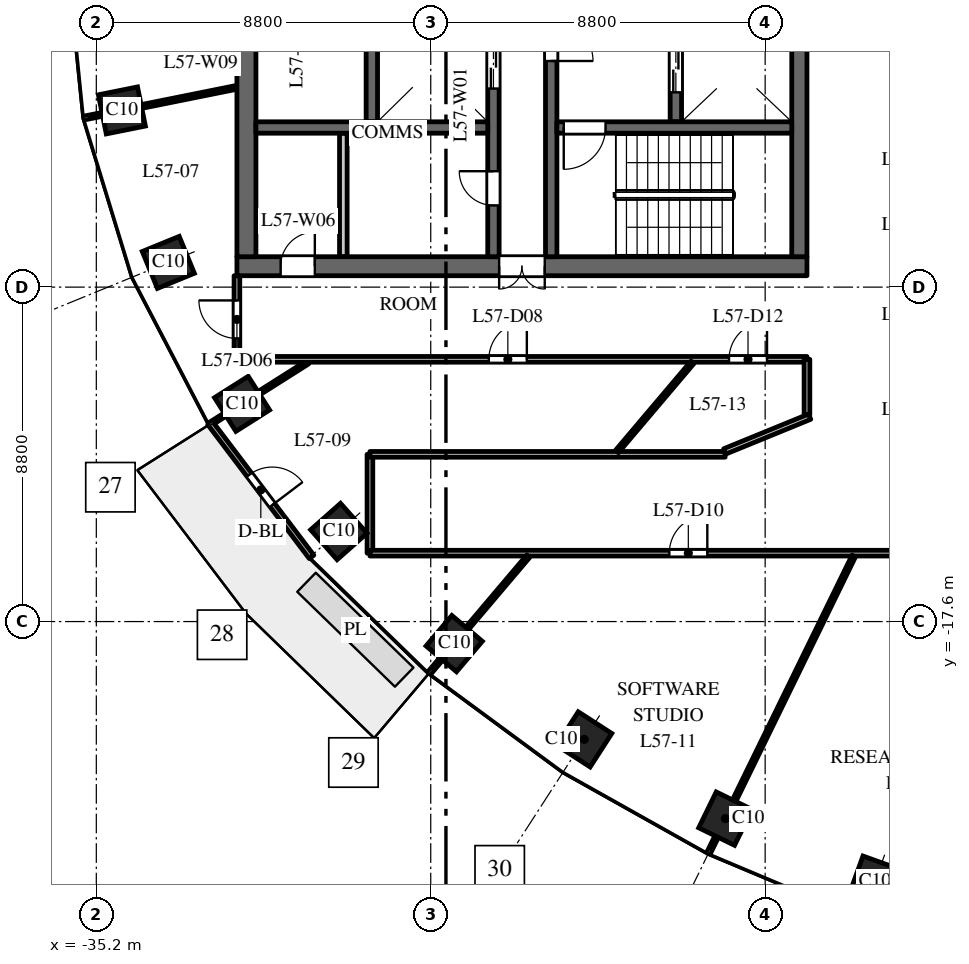
"""IFC4 building model, lengths in metres.
Left out: names, types, materials, properties, quantities, classifications, styles, units other than length and angle.
Written with IfcOpenShell. Run it as: python <this file> out.ifc"""

import sys

from ifc_helpers import new_model, si_unit, direction, frame, frame_2d, origin, origin_2d, place, context, subcontext, project, spatial, rectangle, extrude, element, fill, save


model = new_model("IFC4")
c1 = context("Model", 3, precision=1e-05, world=origin(), true_north=direction((0.0, 1.0)))
c2 = subcontext(c1, "Body", "Model", "MODEL_VIEW")
j1 = project(units=[si_unit("LENGTHUNIT", "METRE"), si_unit("PLANEANGLEUNIT", "RADIAN")], contexts=[c1])
p1 = place(None, origin())
s1 = spatial("IfcSite", under=j1, at=p1, CompositionType="ELEMENT")
p2 = place(p1, origin())
s2 = spatial("IfcBuilding", under=s1, at=p2, CompositionType="ELEMENT")
p3 = place(p2, frame((0.0, 0.0, 269.5)))
s3 = spatial("IfcBuildingStorey", under=s2, at=p3, CompositionType="ELEMENT", Elevation=269.5)
for number, where, z_axis, x_axis in (
    (1, (-34.527, -4.151, 0.0), (0.0, 0.0, 1.0), (0.197, -0.98, 0.0)),
    (2, (-33.305, -8.149, 0.0), (0.0, 0.0, 1.0), (0.379, -0.925, 0.0)),
    (3, (-31.365, -11.871, 0.0), (0.0, 0.0, 1.0), (0.535, -0.845, 0.0)),
    (4, (-28.819, -15.23, 0.0), (0.0, 0.0, 1.0), (0.663, -0.749, 0.0)),
    (5, (-25.783, -18.18, 0.0), (0.0, 0.0, 1.0), (0.763, -0.646, 0.0)),
    (6, (-22.362, -20.7, 0.0), (0.0, 0.0, 1.0), (0.84, -0.542, 0.0)),
    (7, (-18.646, -22.785, 0.0), (0.0, 0.0, 1.0), (0.898, -0.439, 0.0)),
    (8, (-14.709, -24.441, 0.0), (0.0, 0.0, 1.0), (0.941, -0.338, 0.0)),
):
    element("IfcColumn", number, at=place(p3, frame(where, z_axis=z_axis, x_axis=x_axis)), inside=s3, PredefinedType="COLUMN", context=c2, shape_type="SweptSolid", body=[
        extrude(rectangle(XDim=1.05, YDim=1.05, at=origin_2d()), origin(), (0.0, 0.0, 1.0), 4.0),
    ])
p4 = place(p3, frame((-16.5, -8.25, 0.0), z_axis=(0.0, 0.0, 1.0), x_axis=(-1.0, 0.0, 0.0)))
e9 = element("IfcWall", 9, at=p4, inside=s3, PredefinedType="SHEAR", context=c2, shape_type="SweptSolid", body=[
    extrude(rectangle(XDim=15.0, YDim=0.5, at=frame_2d((7.5, 0.0))), origin(), (0.0, 0.0, 1.0), 3.7),
])
p5 = place(p4, frame((6.9, 0.0, 0.0)))
e10 = element("IfcOpeningElement", 10, at=p5, cuts=e9, PredefinedType="OPENING", context=c2, shape_type="SweptSolid", body=[
    extrude(rectangle(XDim=1.2, YDim=2.1, at=frame_2d((0.6, 1.05))), frame((0.0, 0.26, 0.0), z_axis=(0.0, -1.0, 0.0), x_axis=(1.0, 0.0, 0.0)), (0.0, 0.0, 1.0), 0.52),
])
p6 = place(p4, frame((12.95, 0.0, 0.0)))
e11 = element("IfcOpeningElement", 11, at=p6, cuts=e9, PredefinedType="OPENING", context=c2, shape_type="SweptSolid", body=[
    extrude(rectangle(XDim=0.9, YDim=2.1, at=frame_2d((0.45, 1.05))), frame((0.0, 0.26, 0.0), z_axis=(0.0, -1.0, 0.0), x_axis=(1.0, 0.0, 0.0)), (0.0, 0.0, 1.0), 0.52),
])
p7 = place(p3, frame((-27.95, -4.45, 0.0), z_axis=(0.0, 0.0, 1.0), x_axis=(0.0, 1.0, 0.0)))
e12 = element("IfcWall", 12, at=p7, inside=s3, PredefinedType="SHEAR", context=c2, shape_type="SweptSolid", body=[
    extrude(rectangle(XDim=8.9, YDim=0.3, at=frame_2d((4.45, 0.0))), origin(), (0.0, 0.0, 1.0), 3.7),
])
p8 = place(p3, frame((-19.95, -4.45, 0.0), z_axis=(0.0, 0.0, 1.0), x_axis=(0.0, 1.0, 0.0)))
e13 = element("IfcWall", 13, at=p8, inside=s3, PredefinedType="SHEAR", context=c2, shape_type="SweptSolid", body=[
    extrude(rectangle(XDim=8.9, YDim=0.3, at=frame_2d((4.45, 0.0))), origin(), (0.0, 0.0, 1.0), 3.7),
])
p9 = place(p8, frame((0.775, 0.0, 0.0)))
e14 = element("IfcOpeningElement", 14, at=p9, cuts=e13, PredefinedType="OPENING", context=c2, shape_type="SweptSolid", body=[
    extrude(rectangle(XDim=1.2, YDim=2.1, at=frame_2d((0.6, 1.05))), frame((0.0, 0.16, 0.0), z_axis=(0.0, -1.0, 0.0), x_axis=(1.0, 0.0, 0.0)), (0.0, 0.0, 1.0), 0.32),
])
p10 = place(p8, frame((7.25, 0.0, 0.0)))
e15 = element("IfcOpeningElement", 15, at=p10, cuts=e13, PredefinedType="OPENING", context=c2, shape_type="SweptSolid", body=[
    extrude(rectangle(XDim=1.1, YDim=2.1, at=frame_2d((0.55, 1.05))), frame((0.0, 0.16, 0.0), z_axis=(0.0, -1.0, 0.0), x_axis=(1.0, 0.0, 0.0)), (0.0, 0.0, 1.0), 0.32),
])
p11 = place(p3, frame((-24.75, -8.0, 0.0), z_axis=(0.0, 0.0, 1.0), x_axis=(0.0, 1.0, 0.0)))
e16 = element("IfcWall", 16, at=p11, inside=s3, PredefinedType="SHEAR", context=c2, shape_type="SweptSolid", body=[
    extrude(rectangle(XDim=16.0, YDim=0.3, at=frame_2d((8.0, 0.0))), origin(), (0.0, 0.0, 1.0), 3.7),
])
p12 = place(p11, frame((4.425, 0.0, 0.0)))
e17 = element("IfcOpeningElement", 17, at=p12, cuts=e16, PredefinedType="OPENING", context=c2, shape_type="SweptSolid", body=[
    extrude(rectangle(XDim=1.1, YDim=2.1, at=frame_2d((0.55, 1.05))), frame((0.0, 0.16, 0.0), z_axis=(0.0, -1.0, 0.0), x_axis=(1.0, 0.0, 0.0)), (0.0, 0.0, 1.0), 0.32),
])
p13 = place(p11, frame((7.45, 0.0, 0.0)))
e18 = element("IfcOpeningElement", 18, at=p13, cuts=e16, PredefinedType="OPENING", context=c2, shape_type="SweptSolid", body=[
    extrude(rectangle(XDim=1.1, YDim=2.1, at=frame_2d((0.55, 1.05))), frame((0.0, 0.16, 0.0), z_axis=(0.0, -1.0, 0.0), x_axis=(1.0, 0.0, 0.0)), (0.0, 0.0, 1.0), 0.32),
])
p14 = place(p11, frame((10.475, 0.0, 0.0)))
e19 = element("IfcOpeningElement", 19, at=p14, cuts=e16, PredefinedType="OPENING", context=c2, shape_type="SweptSolid", body=[
    extrude(rectangle(XDim=1.1, YDim=2.1, at=frame_2d((0.55, 1.05))), frame((0.0, 0.16, 0.0), z_axis=(0.0, -1.0, 0.0), x_axis=(1.0, 0.0, 0.0)), (0.0, 0.0, 1.0), 0.32),
])
p15 = place(p11, frame((13.75, 0.0, 0.0)))
e20 = element("IfcOpeningElement", 20, at=p15, cuts=e16, PredefinedType="OPENING", context=c2, shape_type="SweptSolid", body=[
    extrude(rectangle(XDim=0.9, YDim=2.1, at=frame_2d((0.45, 1.05))), frame((0.0, 0.16, 0.0), z_axis=(0.0, -1.0, 0.0), x_axis=(1.0, 0.0, 0.0)), (0.0, 0.0, 1.0), 0.32),
])
p16 = place(p11, frame((1.35, 0.0, 0.0)))
e21 = element("IfcOpeningElement", 21, at=p16, cuts=e16, PredefinedType="OPENING", context=c2, shape_type="SweptSolid", body=[
    extrude(rectangle(XDim=0.9, YDim=2.1, at=frame_2d((0.45, 1.05))), frame((0.0, 0.16, 0.0), z_axis=(0.0, -1.0, 0.0), x_axis=(1.0, 0.0, 0.0)), (0.0, 0.0, 1.0), 0.32),
])
p17 = place(p3, frame((-16.7, -8.0, 0.0), z_axis=(0.0, 0.0, 1.0), x_axis=(0.0, 1.0, 0.0)))
e22 = element("IfcWall", 22, at=p17, inside=s3, PredefinedType="SHEAR", context=c2, shape_type="SweptSolid", body=[
    extrude(rectangle(XDim=16.0, YDim=0.4, at=frame_2d((8.0, 0.0))), origin(), (0.0, 0.0, 1.0), 3.7),
])
p18 = place(p3, frame((-31.25, -8.0, 0.0), z_axis=(0.0, 0.0, 1.0), x_axis=(0.0, 1.0, 0.0)))
e23 = element("IfcWall", 23, at=p18, inside=s3, PredefinedType="SHEAR", context=c2, shape_type="SweptSolid", body=[
    extrude(rectangle(XDim=16.0, YDim=0.5, at=frame_2d((8.0, 0.0))), origin(), (0.0, 0.0, 1.0), 3.7),
])
p19 = place(p3, frame((-28.7, -8.0, 0.0), z_axis=(0.0, 0.0, 1.0), x_axis=(0.0, 1.0, 0.0)))
e24 = element("IfcWall", 24, at=p19, inside=s3, PredefinedType="PARTITIONING", context=c2, shape_type="SweptSolid", body=[
    extrude(rectangle(XDim=3.25, YDim=0.2, at=frame_2d((1.625, 0.0))), origin(), (0.0, 0.0, 1.0), 3.7),
])
p20 = place(p3, frame((-24.9, -4.6, 0.0), z_axis=(0.0, 0.0, 1.0), x_axis=(-1.0, 0.0, 0.0)))
e25 = element("IfcWall", 25, at=p20, inside=s3, PredefinedType="SHEAR", context=c2, shape_type="SweptSolid", body=[
    extrude(rectangle(XDim=6.1, YDim=0.3, at=frame_2d((3.05, 0.0))), origin(), (0.0, 0.0, 1.0), 3.7),
])
p21 = place(p3, frame((-23.23, -8.0, 0.0), z_axis=(0.0, 0.0, 1.0), x_axis=(0.0, 1.0, 0.0)))
e26 = element("IfcWall", 26, at=p21, inside=s3, PredefinedType="SHEAR", context=c2, shape_type="SweptSolid", body=[
    extrude(rectangle(XDim=7.875, YDim=0.3, at=frame_2d((3.938, 0.0))), origin(), (0.0, 0.0, 1.0), 3.7),
])
p22 = place(p21, frame((5.15, 0.0, 0.0)))
e27 = element("IfcOpeningElement", 27, at=p22, cuts=e26, PredefinedType="OPENING", context=c2, shape_type="SweptSolid", body=[
    extrude(rectangle(XDim=1.1, YDim=2.1, at=frame_2d((0.55, 1.05))), frame((0.0, 0.16, 0.0), z_axis=(0.0, -1.0, 0.0), x_axis=(1.0, 0.0, 0.0)), (0.0, 0.0, 1.0), 0.32),
])
p23 = place(p3, frame((-16.9, -4.6, 0.0), z_axis=(0.0, 0.0, 1.0), x_axis=(-1.0, 0.0, 0.0)))
e28 = element("IfcWall", 28, at=p23, inside=s3, PredefinedType="SHEAR", context=c2, shape_type="SweptSolid", body=[
    extrude(rectangle(XDim=6.18, YDim=0.3, at=frame_2d((3.09, 0.0))), origin(), (0.0, 0.0, 1.0), 3.7),
])
p24 = place(p23, frame((4.9, 0.0, 0.0)))
e29 = element("IfcOpeningElement", 29, at=p24, cuts=e28, PredefinedType="OPENING", context=c2, shape_type="SweptSolid", body=[
    extrude(rectangle(XDim=1.1, YDim=2.1, at=frame_2d((0.55, 1.05))), frame((0.0, 0.16, 0.0), z_axis=(0.0, -1.0, 0.0), x_axis=(1.0, 0.0, 0.0)), (0.0, 0.0, 1.0), 0.32),
])
p25 = place(p3, frame((-32.208, -12.374, 0.0), z_axis=(0.0, 0.0, 1.0), x_axis=(0.604045763106, -0.796949632081, 0.0)))
e30 = element("IfcWall", 30, at=p25, inside=s3, PredefinedType="STANDARD", context=c2, shape_type="SweptSolid", body=[
    extrude(rectangle(XDim=4.423, YDim=0.15, at=frame_2d((2.212, 0.0))), origin(), (0.0, 0.0, 1.0), 3.7),
])
p26 = place(p25, frame((1.712, 0.0, 0.0)))
e31 = element("IfcOpeningElement", 31, at=p26, cuts=e30, PredefinedType="OPENING", context=c2, shape_type="SweptSolid", body=[
    extrude(rectangle(XDim=1.0, YDim=2.4, at=frame_2d((0.5, 1.2))), frame((0.0, 0.085, 0.0), z_axis=(0.0, -1.0, 0.0), x_axis=(1.0, 0.0, 0.0)), (0.0, 0.0, 1.0), 0.17),
])
p27 = place(p3, frame((-35.512, -4.349, 0.0), z_axis=(0.0, 0.0, 1.0), x_axis=(0.980357474535, 0.197228857227, 0.0)))
e32 = element("IfcWall", 32, at=p27, inside=s3, PredefinedType="PARTITIONING", context=c2, shape_type="SweptSolid", body=[
    extrude(rectangle(XDim=4.092, YDim=0.1, at=frame_2d((2.046, 0.0))), origin(), (0.0, 0.0, 1.0), 3.2),
])
p28 = place(p3, frame((-32.212, -12.408, 0.0), z_axis=(0.0, 0.0, 1.0), x_axis=(0.844810627195, 0.535065420467, 0.0)))
e33 = element("IfcWall", 33, at=p28, inside=s3, PredefinedType="PARTITIONING", context=c2, shape_type="SweptSolid", body=[
    extrude(rectangle(XDim=3.048, YDim=0.1, at=frame_2d((1.524, 0.0))), origin(), (0.0, 0.0, 1.0), 3.7),
])
p29 = place(p3, frame((-31.5, -10.7, 0.0), z_axis=(0.0, 0.0, 1.0), x_axis=(0.0, 1.0, 0.0)))
e34 = element("IfcWall", 34, at=p29, inside=s3, PredefinedType="PARTITIONING", context=c2, shape_type="SweptSolid", body=[
    extrude(rectangle(XDim=2.2, YDim=0.15, at=frame_2d((1.1, 0.0))), origin(), (0.0, 0.0, 1.0), 3.7),
])
p30 = place(p29, frame((0.55, 0.0, 0.0)))
e35 = element("IfcOpeningElement", 35, at=p30, cuts=e34, PredefinedType="OPENING", context=c2, shape_type="SweptSolid", body=[
    extrude(rectangle(XDim=1.0, YDim=2.1, at=frame_2d((0.5, 1.05))), frame((0.0, 0.085, 0.0), z_axis=(0.0, -1.0, 0.0), x_axis=(1.0, 0.0, 0.0)), (0.0, 0.0, 1.0), 0.17),
])
p31 = place(p3, frame((-31.5, -10.7, 0.0), z_axis=(0.0, 0.0, 1.0), x_axis=(1.0, 0.0, 0.0)))
e36 = element("IfcWall", 36, at=p31, inside=s3, PredefinedType="PARTITIONING", context=c2, shape_type="SweptSolid", body=[
    extrude(rectangle(XDim=15.0, YDim=0.15, at=frame_2d((7.5, 0.0))), origin(), (0.0, 0.0, 1.0), 3.1),
])
p32 = place(p31, frame((6.629, 0.0, 0.0)))
e37 = element("IfcOpeningElement", 37, at=p32, cuts=e36, PredefinedType="OPENING", context=c2, shape_type="SweptSolid", body=[
    extrude(rectangle(XDim=1.0, YDim=2.1, at=frame_2d((0.5, 1.05))), frame((0.0, 0.085, 0.0), z_axis=(0.0, -1.0, 0.0), x_axis=(1.0, 0.0, 0.0)), (0.0, 0.0, 1.0), 0.17),
])
p33 = place(p31, frame((12.949, 0.0, 0.0)))
e38 = element("IfcOpeningElement", 38, at=p33, cuts=e36, PredefinedType="OPENING", context=c2, shape_type="SweptSolid", body=[
    extrude(rectangle(XDim=1.0, YDim=2.1, at=frame_2d((0.5, 1.05))), frame((0.0, 0.085, 0.0), z_axis=(0.0, -1.0, 0.0), x_axis=(1.0, 0.0, 0.0)), (0.0, 0.0, 1.0), 0.17),
])
p34 = place(p3, frame((-28.0, -15.8, 0.0), z_axis=(0.0, 0.0, 1.0), x_axis=(0.0, 1.0, 0.0)))
e39 = element("IfcWall", 39, at=p34, inside=s3, PredefinedType="PARTITIONING", context=c2, shape_type="SweptSolid", body=[
    extrude(rectangle(XDim=2.6, YDim=0.15, at=frame_2d((1.3, 0.0))), origin(), (0.0, 0.0, 1.0), 3.0),
])
p35 = place(p3, frame((-28.0, -15.8, 0.0), z_axis=(0.0, 0.0, 1.0), x_axis=(1.0, 0.0, 0.0)))
e40 = element("IfcWall", 40, at=p35, inside=s3, PredefinedType="PARTITIONING", context=c2, shape_type="SweptSolid", body=[
    extrude(rectangle(XDim=19.809, YDim=0.15, at=frame_2d((9.905, 0.0))), origin(), (0.0, 0.0, 1.0), 2.75),
])
p36 = place(p35, frame((7.878, 0.0, 0.0)))
e41 = element("IfcOpeningElement", 41, at=p36, cuts=e40, PredefinedType="OPENING", context=c2, shape_type="SweptSolid", body=[
    extrude(rectangle(XDim=1.0, YDim=2.1, at=frame_2d((0.5, 1.05))), frame((0.0, 0.085, 0.0), z_axis=(0.0, -1.0, 0.0), x_axis=(1.0, 0.0, 0.0)), (0.0, 0.0, 1.0), 0.17),
])
p37 = place(p35, frame((15.91, 0.0, 0.0)))
e42 = element("IfcOpeningElement", 42, at=p37, cuts=e40, PredefinedType="OPENING", context=c2, shape_type="SweptSolid", body=[
    extrude(rectangle(XDim=1.0, YDim=2.1, at=frame_2d((0.5, 1.05))), frame((0.0, 0.085, 0.0), z_axis=(0.0, -1.0, 0.0), x_axis=(1.0, 0.0, 0.0)), (0.0, 0.0, 1.0), 0.17),
])
p38 = place(p3, frame((-28.0, -13.2, 0.0), z_axis=(0.0, 0.0, 1.0), x_axis=(1.0, 0.0, 0.0)))
e43 = element("IfcWall", 43, at=p38, inside=s3, PredefinedType="PARTITIONING", context=c2, shape_type="SweptSolid", body=[
    extrude(rectangle(XDim=9.347, YDim=0.15, at=frame_2d((4.673, 0.0))), origin(), (0.0, 0.0, 1.0), 2.75),
])
p39 = place(p3, frame((-26.43, -18.945, 0.0), z_axis=(0.0, 0.0, 1.0), x_axis=(0.646323350317, 0.763063645337, 0.0)))
e44 = element("IfcWall", 44, at=p39, inside=s3, PredefinedType="PARTITIONING", context=c2, shape_type="SweptSolid", body=[
    extrude(rectangle(XDim=4.02, YDim=0.1, at=frame_2d((2.01, 0.0))), origin(), (0.0, 0.0, 1.0), 2.75),
])
p40 = place(p3, frame((-21.499, -13.125, 0.0), z_axis=(0.0, 0.0, 1.0), x_axis=(0.646354899778, 0.763036921474, 0.0)))
e45 = element("IfcWall", 45, at=p40, inside=s3, PredefinedType="PARTITIONING", context=c2, shape_type="SweptSolid", body=[
    extrude(rectangle(XDim=3.076, YDim=0.1, at=frame_2d((1.538, 0.0))), origin(), (0.0, 0.0, 1.0), 3.7),
])
p41 = place(p3, frame((-19.086, -23.685, 0.0), z_axis=(0.0, 0.0, 1.0), x_axis=(0.439174872977, 0.898401597809, 0.0)))
e46 = element("IfcWall", 46, at=p41, inside=s3, PredefinedType="PARTITIONING", context=c2, shape_type="SweptSolid", body=[
    extrude(rectangle(XDim=8.693, YDim=0.1, at=frame_2d((4.347, 0.0))), origin(), (0.0, 0.0, 1.0), 2.85),
])
p42 = place(p3, frame((-18.664, -13.123, 0.0), z_axis=(0.0, 0.0, 1.0), x_axis=(0.925590432986, 0.378526551731, 0.0)))
e47 = element("IfcWall", 47, at=p42, inside=s3, PredefinedType="PARTITIONING", context=c2, shape_type="SweptSolid", body=[
    extrude(rectangle(XDim=2.415, YDim=0.15, at=frame_2d((1.208, 0.0))), origin(), (0.0, 0.0, 1.0), 2.75),
])
p43 = place(p3, frame((-16.5, -12.157, 0.0), z_axis=(0.0, 0.0, 1.0), x_axis=(0.0, 1.0, 0.0)))
e48 = element("IfcWall", 48, at=p43, inside=s3, PredefinedType="PARTITIONING", context=c2, shape_type="SweptSolid", body=[
    extrude(rectangle(XDim=1.457, YDim=0.15, at=frame_2d((0.729, 0.0))), origin(), (0.0, 0.0, 1.0), 2.75),
])
p44 = place(p9, origin())
e49 = element("IfcDoor", 49, at=p44, inside=s3, OperationType="DOUBLE_DOOR_SLIDING", PredefinedType="DOOR", context=c2, shape_type="SweptSolid", body=[
    extrude(rectangle(XDim=1.2, YDim=2.1, at=frame_2d((0.6, 1.05))), frame((0.0, 0.025, 0.0), z_axis=(0.0, -1.0, 0.0), x_axis=(1.0, 0.0, 0.0)), (0.0, 0.0, 1.0), 0.05),
])
fill(e14, e49)
p45 = place(p12, origin())
e50 = element("IfcDoor", 50, at=p45, inside=s3, OperationType="DOUBLE_DOOR_SLIDING", PredefinedType="DOOR", context=c2, shape_type="SweptSolid", body=[
    extrude(rectangle(XDim=1.1, YDim=2.1, at=frame_2d((0.55, 1.05))), frame((0.0, 0.025, 0.0), z_axis=(0.0, -1.0, 0.0), x_axis=(1.0, 0.0, 0.0)), (0.0, 0.0, 1.0), 0.05),
])
fill(e17, e50)
p46 = place(p24, origin())
e51 = element("IfcDoor", 51, at=p46, inside=s3, OperationType="SINGLE_SWING_LEFT", PredefinedType="DOOR", context=c2, shape_type="SweptSolid", body=[
    extrude(rectangle(XDim=1.1, YDim=2.1, at=frame_2d((0.55, 1.05))), frame((0.0, 0.025, 0.0), z_axis=(0.0, -1.0, 0.0), x_axis=(1.0, 0.0, 0.0)), (0.0, 0.0, 1.0), 0.05),
])
fill(e29, e51)
p47 = place(p22, origin())
e52 = element("IfcDoor", 52, at=p47, inside=s3, OperationType="SINGLE_SWING_LEFT", PredefinedType="DOOR", context=c2, shape_type="SweptSolid", body=[
    extrude(rectangle(XDim=1.1, YDim=2.1, at=frame_2d((0.55, 1.05))), frame((0.0, 0.025, 0.0), z_axis=(0.0, -1.0, 0.0), x_axis=(1.0, 0.0, 0.0)), (0.0, 0.0, 1.0), 0.05),
])
fill(e27, e52)
p48 = place(p5, origin())
e53 = element("IfcDoor", 53, at=p48, inside=s3, OperationType="DOUBLE_DOOR_DOUBLE_SWING", PredefinedType="DOOR", context=c2, shape_type="SweptSolid", body=[
    extrude(rectangle(XDim=1.2, YDim=2.1, at=frame_2d((0.6, 1.05))), frame((0.0, 0.025, 0.0), z_axis=(0.0, -1.0, 0.0), x_axis=(1.0, 0.0, 0.0)), (0.0, 0.0, 1.0), 0.05),
])
fill(e10, e53)
p49 = place(p16, origin())
e54 = element("IfcDoor", 54, at=p49, inside=s3, OperationType="SINGLE_SWING_LEFT", PredefinedType="DOOR", context=c2, shape_type="SweptSolid", body=[
    extrude(rectangle(XDim=0.9, YDim=2.1, at=frame_2d((0.45, 1.05))), frame((0.0, 0.025, 0.0), z_axis=(0.0, -1.0, 0.0), x_axis=(1.0, 0.0, 0.0)), (0.0, 0.0, 1.0), 0.05),
])
fill(e21, e54)
p50 = place(p6, origin())
e55 = element("IfcDoor", 55, at=p50, inside=s3, OperationType="SINGLE_SWING_LEFT", PredefinedType="DOOR", context=c2, shape_type="SweptSolid", body=[
    extrude(rectangle(XDim=0.9, YDim=2.1, at=frame_2d((0.45, 1.05))), frame((0.0, 0.025, 0.0), z_axis=(0.0, -1.0, 0.0), x_axis=(1.0, 0.0, 0.0)), (0.0, 0.0, 1.0), 0.05),
])
fill(e11, e55)
p51 = place(p26, origin())
e56 = element("IfcDoor", 56, at=p51, inside=s3, OperationType="SINGLE_SWING_RIGHT", PredefinedType="DOOR", context=c2, shape_type="SweptSolid", body=[
    extrude(rectangle(XDim=1.0, YDim=2.4, at=frame_2d((0.5, 1.2))), frame((0.0, 0.025, 0.0), z_axis=(0.0, -1.0, 0.0), x_axis=(1.0, 0.0, 0.0)), (0.0, 0.0, 1.0), 0.05),
])
fill(e31, e56)
p52 = place(p30, origin())
e57 = element("IfcDoor", 57, at=p52, inside=s3, OperationType="SINGLE_SWING_RIGHT", PredefinedType="DOOR", context=c2, shape_type="SweptSolid", body=[
    extrude(rectangle(XDim=1.0, YDim=2.1, at=frame_2d((0.5, 1.05))), frame((0.0, 0.025, 0.0), z_axis=(0.0, -1.0, 0.0), x_axis=(1.0, 0.0, 0.0)), (0.0, 0.0, 1.0), 0.05),
])
fill(e35, e57)
p53 = place(p32, origin())
e58 = element("IfcDoor", 58, at=p53, inside=s3, OperationType="SINGLE_SWING_RIGHT", PredefinedType="DOOR", context=c2, shape_type="SweptSolid", body=[
    extrude(rectangle(XDim=1.0, YDim=2.1, at=frame_2d((0.5, 1.05))), frame((0.0, 0.025, 0.0), z_axis=(0.0, -1.0, 0.0), x_axis=(1.0, 0.0, 0.0)), (0.0, 0.0, 1.0), 0.05),
])
fill(e37, e58)
p54 = place(p36, origin())
e59 = element("IfcDoor", 59, at=p54, inside=s3, OperationType="SINGLE_SWING_RIGHT", PredefinedType="DOOR", context=c2, shape_type="SweptSolid", body=[
    extrude(rectangle(XDim=1.0, YDim=2.1, at=frame_2d((0.5, 1.05))), frame((0.0, 0.025, 0.0), z_axis=(0.0, -1.0, 0.0), x_axis=(1.0, 0.0, 0.0)), (0.0, 0.0, 1.0), 0.05),
])
fill(e41, e59)
p55 = place(p33, origin())
e60 = element("IfcDoor", 60, at=p55, inside=s3, OperationType="SINGLE_SWING_RIGHT", PredefinedType="DOOR", context=c2, shape_type="SweptSolid", body=[
    extrude(rectangle(XDim=1.0, YDim=2.1, at=frame_2d((0.5, 1.05))), frame((0.0, 0.025, 0.0), z_axis=(0.0, -1.0, 0.0), x_axis=(1.0, 0.0, 0.0)), (0.0, 0.0, 1.0), 0.05),
])
fill(e38, e60)
save(model, sys.argv[1])
